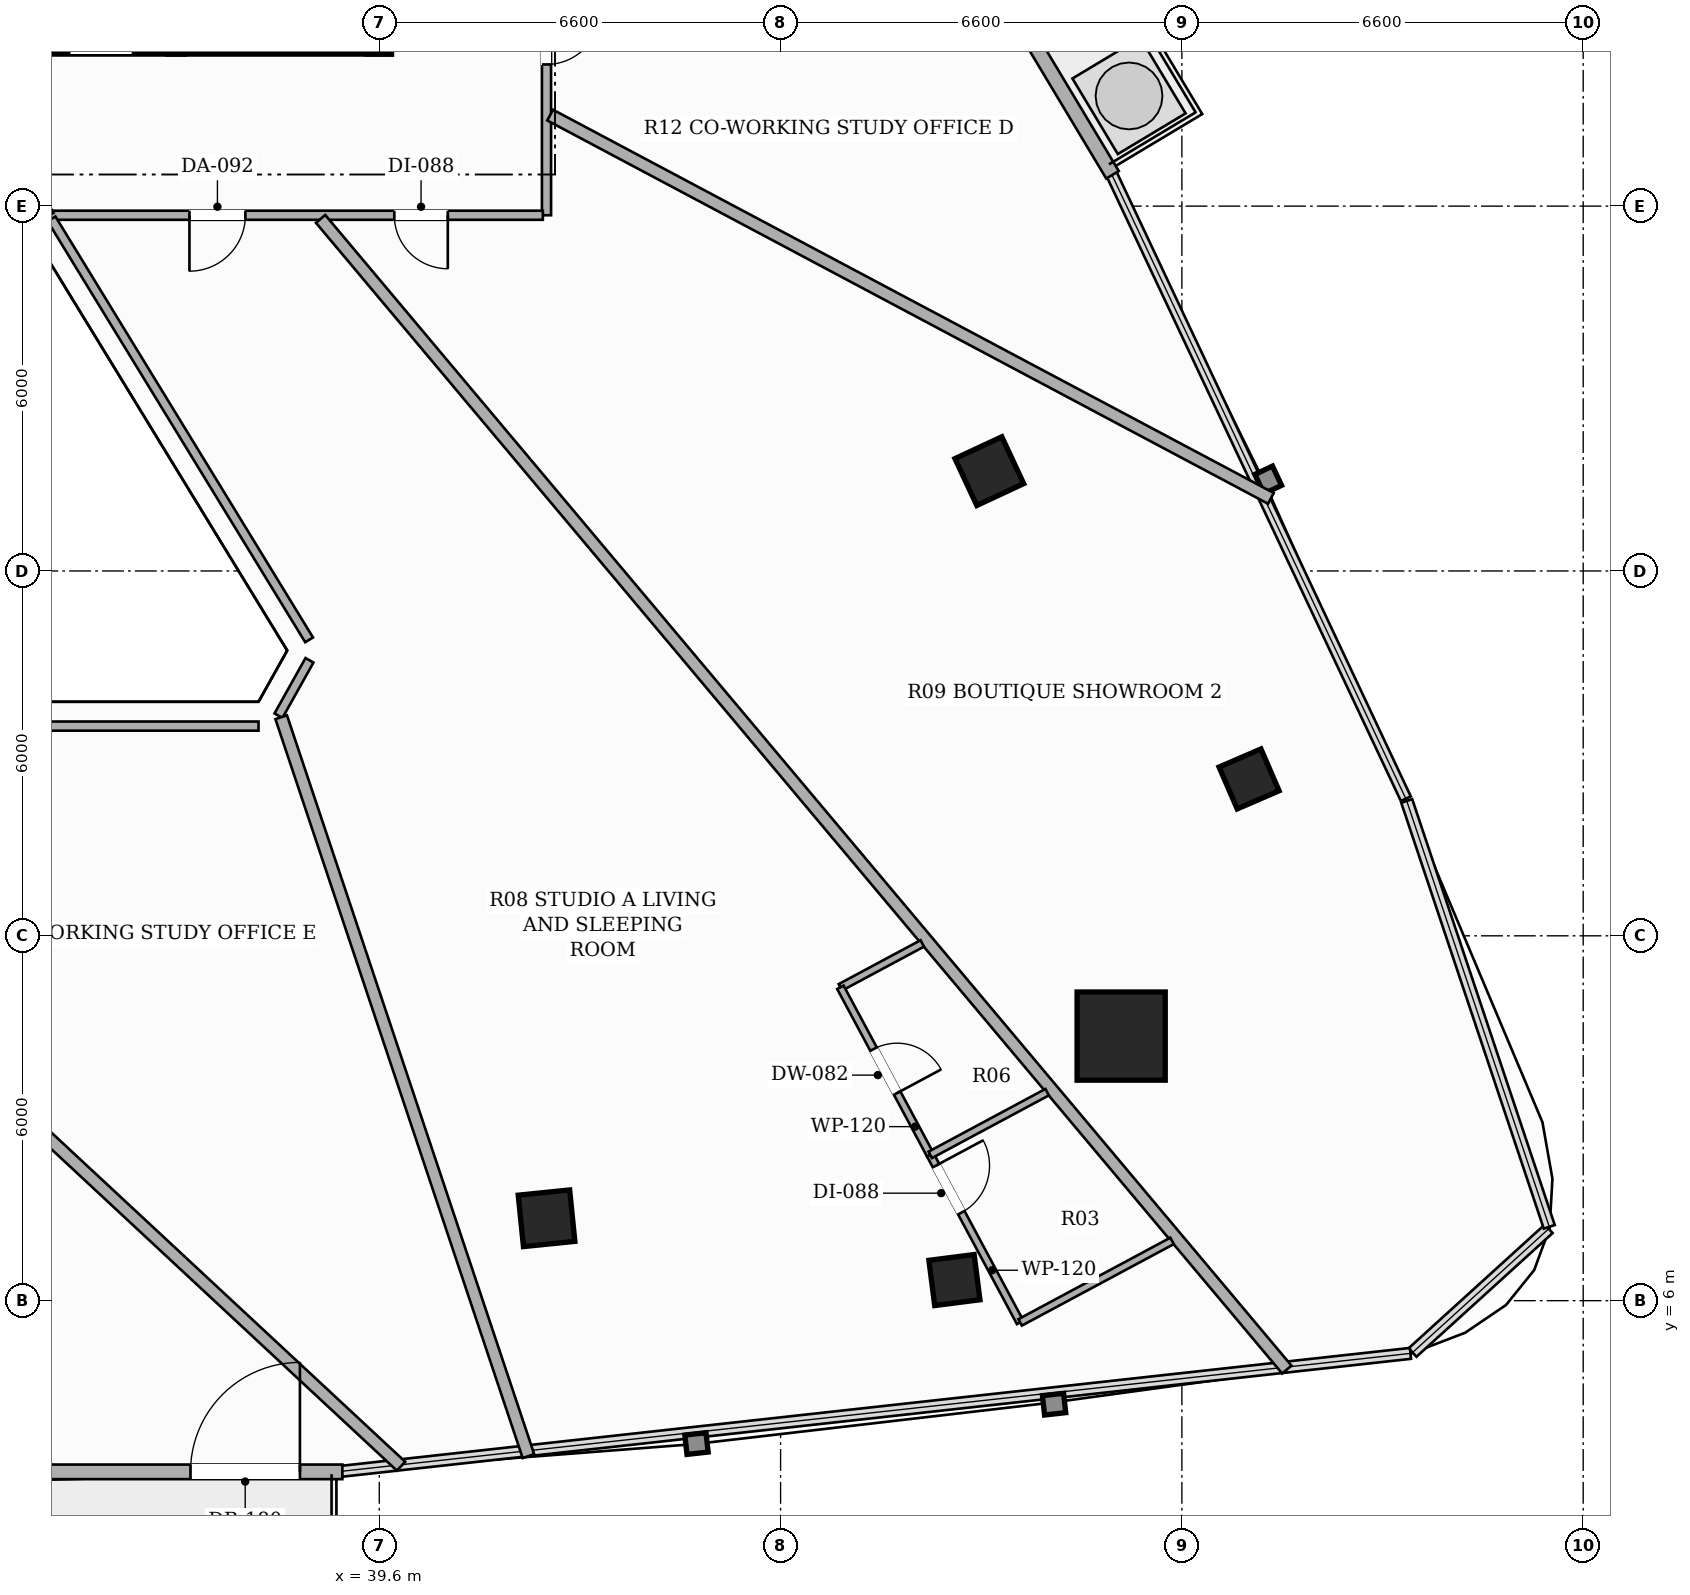
"""IFC4 building model, lengths in metres.
Left out: names, types, materials, properties, quantities, classifications, styles, units other than length and angle.
Written with IfcOpenShell. Run it as: python <this file> out.ifc"""

import sys

from ifc_helpers import new_model, si_unit, direction, frame, frame_2d, origin, origin_2d, place, context, subcontext, project, spatial, rectangle, hollow_rectangle, extrude, element, fill, save


model = new_model("IFC4")
c1 = context("Model", 3, precision=1e-05, world=origin(), true_north=direction((0.0, 1.0)))
c2 = subcontext(c1, "Body", "Model", "MODEL_VIEW")
j1 = project(units=[si_unit("LENGTHUNIT", "METRE"), si_unit("PLANEANGLEUNIT", "RADIAN")], contexts=[c1])
p1 = place(None, origin())
s1 = spatial("IfcSite", under=j1, at=p1, CompositionType="ELEMENT")
p2 = place(p1, origin())
s2 = spatial("IfcBuilding", under=s1, at=p2, CompositionType="ELEMENT")
p3 = place(p2, frame((0.0, 0.0, 126.5)))
s3 = spatial("IfcBuildingStorey", under=s2, at=p3, CompositionType="ELEMENT", Elevation=126.5)
p4 = place(p3, frame((26.2, 26.7, 0.0), z_axis=(0.0, 0.0, 1.0), x_axis=(1.0, 0.0, 0.0)))
e1 = element("IfcWall", 1, at=p4, inside=s3, PredefinedType="SHEAR", context=c2, shape_type="SweptSolid", body=[
    extrude(rectangle(XDim=13.6, YDim=0.4, at=frame_2d((6.8, 0.0))), origin(), (0.0, 0.0, 1.0), 3.3),
])
p5 = place(p4, frame((4.35, 0.0, 0.0)))
e2 = element("IfcOpeningElement", 2, at=p5, cuts=e1, PredefinedType="OPENING", context=c2, shape_type="SweptSolid", body=[
    extrude(rectangle(XDim=1.05, YDim=2.15, at=frame_2d((0.525, 1.075))), frame((0.0, 0.21, 0.0), z_axis=(0.0, -1.0, 0.0), x_axis=(1.0, 0.0, 0.0)), (0.0, 0.0, 1.0), 0.42),
])
p6 = place(p4, frame((8.3, 0.0, 0.0)))
e3 = element("IfcOpeningElement", 3, at=p6, cuts=e1, PredefinedType="OPENING", context=c2, shape_type="SweptSolid", body=[
    extrude(rectangle(XDim=1.05, YDim=2.15, at=frame_2d((0.525, 1.075))), frame((0.0, 0.21, 0.0), z_axis=(0.0, -1.0, 0.0), x_axis=(1.0, 0.0, 0.0)), (0.0, 0.0, 1.0), 0.42),
])
p7 = place(p3, frame((39.6, 26.5, 0.0), z_axis=(0.0, 0.0, 1.0), x_axis=(0.0, 1.0, 0.0)))
e4 = element("IfcWall", 4, at=p7, inside=s3, PredefinedType="SHEAR", context=c2, shape_type="SweptSolid", body=[
    extrude(rectangle(XDim=7.6, YDim=0.4, at=frame_2d((3.8, 0.0))), origin(), (0.0, 0.0, 1.0), 3.3),
])
p8 = place(p3, frame((36.26, 26.5, 0.0), z_axis=(0.0, 0.0, 1.0), x_axis=(0.0, 1.0, 0.0)))
e5 = element("IfcWall", 5, at=p8, inside=s3, PredefinedType="SHEAR", context=c2, shape_type="SweptSolid", body=[
    extrude(rectangle(XDim=8.15, YDim=0.28, at=frame_2d((4.075, 0.0))), origin(), (0.0, 0.0, 1.0), 3.3),
])
p9 = place(p8, frame((0.6, 0.0, 0.0)))
e6 = element("IfcOpeningElement", 6, at=p9, cuts=e5, PredefinedType="OPENING", context=c2, shape_type="SweptSolid", body=[
    extrude(rectangle(XDim=1.05, YDim=2.15, at=frame_2d((0.525, 1.075))), frame((0.0, 0.15, 0.0), z_axis=(0.0, -1.0, 0.0), x_axis=(1.0, 0.0, 0.0)), (0.0, 0.0, 1.0), 0.3),
])
p10 = place(p3, frame((51.801, 10.351, 0.0), z_axis=(0.0, 0.0, 1.0), x_axis=(1.0, 0.0, 0.0)))
e7 = element("IfcColumn", 7, at=p10, inside=s3, PredefinedType="COLUMN", context=c2, shape_type="SweptSolid", body=[
    extrude(hollow_rectangle(XDim=1.45, YDim=1.45, WallThickness=0.045, at=origin_2d()), origin(), (0.0, 0.0, 1.0), 3.3),
])
for number, where, z_axis, x_axis in (
    (8, (42.351, 7.355, 0.0), (0.0, 0.0, 1.0), (0.995, 0.101, 0.0)),
    (9, (49.633, 19.642, 0.0), (0.0, 0.0, 1.0), (-0.423, 0.906, 0.0)),
):
    element("IfcColumn", number, at=place(p3, frame(where, z_axis=z_axis, x_axis=x_axis)), inside=s3, PredefinedType="COLUMN", context=c2, shape_type="SweptSolid", body=[
        extrude(hollow_rectangle(XDim=0.85, YDim=0.85, WallThickness=0.028, at=origin_2d()), origin(), (0.0, 0.0, 1.0), 3.3),
    ])
for number, where, z_axis, x_axis in (
    (10, (49.059, 6.339, 0.0), (0.0, 0.0, 1.0), (0.992, 0.127, 0.0)),
    (11, (53.905, 14.58, 0.0), (0.0, 0.0, 1.0), (-0.397, 0.918, 0.0)),
):
    element("IfcColumn", number, at=place(p3, frame(where, z_axis=z_axis, x_axis=x_axis)), inside=s3, PredefinedType="COLUMN", context=c2, shape_type="SweptSolid", body=[
        extrude(hollow_rectangle(XDim=0.75, YDim=0.75, WallThickness=0.025, at=origin_2d()), origin(), (0.0, 0.0, 1.0), 3.3),
    ])
p11 = place(p3, frame((27.007, 3.185, 0.0), z_axis=(0.0, 0.0, 1.0), x_axis=(1.0, 0.0, 0.0)))
e12 = element("IfcWall", 12, at=p11, inside=s3, PredefinedType="SOLIDWALL", context=c2, shape_type="SweptSolid", body=[
    extrude(rectangle(XDim=11.986, YDim=0.24, at=frame_2d((5.993, 0.0))), origin(), (0.0, 0.0, 1.0), 2.624),
])
p12 = place(p11, frame((9.488, 0.0, 0.0)))
e13 = element("IfcOpeningElement", 13, at=p12, cuts=e12, PredefinedType="OPENING", context=c2, shape_type="SweptSolid", body=[
    extrude(rectangle(XDim=1.8, YDim=2.2, at=frame_2d((0.9, 1.1))), frame((0.0, 0.13, 0.0), z_axis=(0.0, -1.0, 0.0), x_axis=(1.0, 0.0, 0.0)), (0.0, 0.0, 1.0), 0.26),
])
p13 = place(p3, frame((51.659, 24.515, 0.0), z_axis=(0.0, 0.0, 1.0), x_axis=(-0.514343998995, 0.857583961311, 0.0)))
e14 = element("IfcWall", 14, at=p13, inside=s3, PredefinedType="SOLIDWALL", context=c2, shape_type="SweptSolid", body=[
    extrude(rectangle(XDim=11.593, YDim=0.24, at=frame_2d((5.797, 0.0))), origin(), (0.0, 0.0, 1.0), 2.624),
])
p14 = place(p13, frame((9.096, 0.0, 0.0)))
e15 = element("IfcOpeningElement", 15, at=p14, cuts=e14, PredefinedType="OPENING", context=c2, shape_type="SweptSolid", body=[
    extrude(rectangle(XDim=1.8, YDim=2.2, at=frame_2d((0.9, 1.1))), frame((0.0, 0.13, 0.0), z_axis=(0.0, -1.0, 0.0), x_axis=(1.0, 0.0, 0.0)), (0.0, 0.0, 1.0), 0.26),
])
p15 = place(p3, frame((42.35, 28.34, 0.0), z_axis=(0.0, 0.0, 1.0), x_axis=(0.0, -1.0, 0.0)))
e16 = element("IfcWall", 16, at=p15, inside=s3, PredefinedType="PARTITIONING", context=c2, shape_type="SweptSolid", body=[
    extrude(rectangle(XDim=4.49, YDim=0.15, at=frame_2d((2.245, 0.0))), origin(), (0.0, 0.0, 1.0), 2.721),
])
p16 = place(p15, frame((1.13, 0.0, 0.0)))
e17 = element("IfcOpeningElement", 17, at=p16, cuts=e16, PredefinedType="OPENING", context=c2, shape_type="SweptSolid", body=[
    extrude(rectangle(XDim=0.88, YDim=2.1, at=frame_2d((0.44, 1.05))), frame((0.0, 0.085, 0.0), z_axis=(0.0, -1.0, 0.0), x_axis=(1.0, 0.0, 0.0)), (0.0, 0.0, 1.0), 0.17),
])
p17 = place(p3, frame((42.29, 23.85, 0.0), z_axis=(0.0, 0.0, 1.0), x_axis=(-1.0, 0.0, 0.0)))
e18 = element("IfcWall", 18, at=p17, inside=s3, PredefinedType="PARTITIONING", context=c2, shape_type="SweptSolid", body=[
    extrude(rectangle(XDim=8.111, YDim=0.15, at=frame_2d((4.056, 0.0))), origin(), (0.0, 0.0, 1.0), 2.492),
])
p18 = place(p17, frame((1.563, 0.0, 0.0)))
e19 = element("IfcOpeningElement", 19, at=p18, cuts=e18, PredefinedType="OPENING", context=c2, shape_type="SweptSolid", body=[
    extrude(rectangle(XDim=0.88, YDim=2.1, at=frame_2d((0.44, 1.05))), frame((0.0, 0.085, 0.0), z_axis=(0.0, -1.0, 0.0), x_axis=(1.0, 0.0, 0.0)), (0.0, 0.0, 1.0), 0.17),
])
p19 = place(p17, frame((4.892, 0.0, 0.0)))
e20 = element("IfcOpeningElement", 20, at=p19, cuts=e18, PredefinedType="OPENING", context=c2, shape_type="SweptSolid", body=[
    extrude(rectangle(XDim=0.92, YDim=2.15, at=frame_2d((0.46, 1.075))), frame((0.0, 0.085, 0.0), z_axis=(0.0, -1.0, 0.0), x_axis=(1.0, 0.0, 0.0)), (0.0, 0.0, 1.0), 0.17),
])
p20 = place(p3, frame((34.179, 23.85, 0.0), z_axis=(0.0, 0.0, 1.0), x_axis=(-0.527828834635, 0.849350764601, 0.0)))
e21 = element("IfcWall", 21, at=p20, inside=s3, PredefinedType="PARTITIONING", context=c2, shape_type="SweptSolid", body=[
    extrude(rectangle(XDim=0.678, YDim=0.15, at=frame_2d((0.339, 0.0))), origin(), (0.0, 0.0, 1.0), 3.06),
])
p21 = place(p3, frame((34.21, 23.79, 0.0), z_axis=(0.0, 0.0, 1.0), x_axis=(0.521925672495, -0.852990968528, 0.0)))
e22 = element("IfcWall", 22, at=p21, inside=s3, PredefinedType="PARTITIONING", context=c2, shape_type="SweptSolid", body=[
    extrude(rectangle(XDim=8.116, YDim=0.15, at=frame_2d((4.058, 0.0))), origin(), (0.0, 0.0, 1.0), 2.721),
])
p22 = place(p3, frame((38.452, 16.531, 0.0), z_axis=(0.0, 0.0, 1.0), x_axis=(-0.488539276118, -0.872541904833, 0.0)))
e23 = element("IfcWall", 23, at=p22, inside=s3, PredefinedType="PARTITIONING", context=c2, shape_type="SweptSolid", body=[
    extrude(rectangle(XDim=1.044, YDim=0.15, at=frame_2d((0.522, 0.0))), origin(), (0.0, 0.0, 1.0), 3.06),
])
p23 = place(p3, frame((37.614, 15.449, 0.0), z_axis=(0.0, 0.0, 1.0), x_axis=(-1.0, 0.0, 0.0)))
e24 = element("IfcWall", 24, at=p23, inside=s3, PredefinedType="PARTITIONING", context=c2, shape_type="SweptSolid", body=[
    extrude(rectangle(XDim=9.228, YDim=0.15, at=frame_2d((4.614, 0.0))), origin(), (0.0, 0.0, 1.0), 2.721),
])
p24 = place(p3, frame((54.526, 4.867, 0.0), z_axis=(0.0, 0.0, 1.0), x_axis=(-0.643084567011, 0.765795168222, 0.0)))
e25 = element("IfcWall", 25, at=p24, inside=s3, PredefinedType="PARTITIONING", context=c2, shape_type="SweptSolid", body=[
    extrude(rectangle(XDim=24.71, YDim=0.2, at=frame_2d((12.355, 0.0))), origin(), (0.0, 0.0, 1.0), 2.413),
])
p25 = place(p3, frame((42.41, 25.497, 0.0), z_axis=(0.0, 0.0, 1.0), x_axis=(0.882944726502, -0.46947695358, 0.0)))
e26 = element("IfcWall", 26, at=p25, inside=s3, PredefinedType="PARTITIONING", context=c2, shape_type="SweptSolid", body=[
    extrude(rectangle(XDim=13.426, YDim=0.2, at=frame_2d((6.713, 0.0))), origin(), (0.0, 0.0, 1.0), 2.413),
])
p26 = place(p3, frame((42.053, 3.444, 0.0), z_axis=(0.0, 0.0, 1.0), x_axis=(-0.317325063931, 0.948316826699, 0.0)))
e27 = element("IfcWall", 27, at=p26, inside=s3, PredefinedType="PARTITIONING", context=c2, shape_type="SweptSolid", body=[
    extrude(rectangle(XDim=12.813, YDim=0.2, at=frame_2d((6.406, 0.0))), origin(), (0.0, 0.0, 1.0), 2.413),
])
p27 = place(p3, frame((39.958, 3.278, 0.0), z_axis=(0.0, 0.0, 1.0), x_axis=(-0.732155976475, 0.681137009795, 0.0)))
e28 = element("IfcWall", 28, at=p27, inside=s3, PredefinedType="PARTITIONING", context=c2, shape_type="SweptSolid", body=[
    extrude(rectangle(XDim=18.778, YDim=0.2, at=frame_2d((9.389, 0.0))), origin(), (0.0, 0.0, 1.0), 2.413),
])
p28 = place(p3, frame((48.53, 11.875, 0.0), z_axis=(0.0, 0.0, 1.0), x_axis=(-0.881239847135, -0.472669368398, 0.0)))
e29 = element("IfcWall", 29, at=p28, inside=s3, PredefinedType="PARTITIONING", context=c2, shape_type="SweptSolid", body=[
    extrude(rectangle(XDim=1.527, YDim=0.12, at=frame_2d((0.764, 0.0))), origin(), (0.0, 0.0, 1.0), 3.06),
])
p29 = place(p3, frame((47.184, 11.153, 0.0), z_axis=(0.0, 0.0, 1.0), x_axis=(0.472734891499, -0.881204699465, 0.0)))
e30 = element("IfcWall", 30, at=p29, inside=s3, PredefinedType="PARTITIONING", context=c2, shape_type="SweptSolid", body=[
    extrude(rectangle(XDim=3.126, YDim=0.12, at=frame_2d((1.563, 0.0))), origin(), (0.0, 0.0, 1.0), 2.721),
])
p30 = place(p29, frame((1.153, 0.0, 0.0)))
e31 = element("IfcOpeningElement", 31, at=p30, cuts=e30, PredefinedType="OPENING", context=c2, shape_type="SweptSolid", body=[
    extrude(rectangle(XDim=0.82, YDim=2.1, at=frame_2d((0.41, 1.05))), frame((0.0, 0.07, 0.0), z_axis=(0.0, -1.0, 0.0), x_axis=(1.0, 0.0, 0.0)), (0.0, 0.0, 1.0), 0.14),
])
p31 = place(p3, frame((48.662, 8.398, 0.0), z_axis=(0.0, 0.0, 1.0), x_axis=(0.472706781447, -0.881219778928, 0.0)))
e32 = element("IfcWall", 32, at=p31, inside=s3, PredefinedType="PARTITIONING", context=c2, shape_type="SweptSolid", body=[
    extrude(rectangle(XDim=3.126, YDim=0.12, at=frame_2d((1.563, 0.0))), origin(), (0.0, 0.0, 1.0), 2.413),
])
p32 = place(p31, frame((0.2, 0.0, 0.0)))
e33 = element("IfcOpeningElement", 33, at=p32, cuts=e32, PredefinedType="OPENING", context=c2, shape_type="SweptSolid", body=[
    extrude(rectangle(XDim=0.88, YDim=2.1, at=frame_2d((0.44, 1.05))), frame((0.0, 0.07, 0.0), z_axis=(0.0, -1.0, 0.0), x_axis=(1.0, 0.0, 0.0)), (0.0, 0.0, 1.0), 0.14),
])
p33 = place(p3, frame((50.14, 5.643, 0.0), z_axis=(0.0, 0.0, 1.0), x_axis=(0.881244272045, 0.472661118548, 0.0)))
e34 = element("IfcWall", 34, at=p33, inside=s3, PredefinedType="PARTITIONING", context=c2, shape_type="SweptSolid", body=[
    extrude(rectangle(XDim=2.835, YDim=0.12, at=frame_2d((1.417, 0.0))), origin(), (0.0, 0.0, 1.0), 2.619),
])
p34 = place(p3, frame((50.584, 9.429, 0.0), z_axis=(0.0, 0.0, 1.0), x_axis=(-0.88120690194, -0.472730785937, 0.0)))
e35 = element("IfcWall", 35, at=p34, inside=s3, PredefinedType="PARTITIONING", context=c2, shape_type="SweptSolid", body=[
    extrude(rectangle(XDim=2.181, YDim=0.12, at=frame_2d((1.09, 0.0))), origin(), (0.0, 0.0, 1.0), 3.06),
])
p35 = place(p12, origin())
e36 = element("IfcDoor", 36, at=p35, inside=s3, OperationType="SINGLE_SWING_RIGHT", PredefinedType="DOOR", context=c2, shape_type="SweptSolid", body=[
    extrude(rectangle(XDim=1.8, YDim=2.2, at=frame_2d((0.9, 1.1))), frame((0.0, 0.025, 0.0), z_axis=(0.0, -1.0, 0.0), x_axis=(1.0, 0.0, 0.0)), (0.0, 0.0, 1.0), 0.05),
])
fill(e13, e36)
p36 = place(p18, origin())
e37 = element("IfcDoor", 37, at=p36, inside=s3, OperationType="SINGLE_SWING_LEFT", PredefinedType="DOOR", context=c2, shape_type="SweptSolid", body=[
    extrude(rectangle(XDim=0.88, YDim=2.1, at=frame_2d((0.44, 1.05))), frame((0.0, 0.025, 0.0), z_axis=(0.0, -1.0, 0.0), x_axis=(1.0, 0.0, 0.0)), (0.0, 0.0, 1.0), 0.05),
])
fill(e19, e37)
p37 = place(p19, origin())
e38 = element("IfcDoor", 38, at=p37, inside=s3, OperationType="SINGLE_SWING_RIGHT", PredefinedType="DOOR", context=c2, shape_type="SweptSolid", body=[
    extrude(rectangle(XDim=0.92, YDim=2.15, at=frame_2d((0.46, 1.075))), frame((0.0, 0.025, 0.0), z_axis=(0.0, -1.0, 0.0), x_axis=(1.0, 0.0, 0.0)), (0.0, 0.0, 1.0), 0.05),
])
fill(e20, e38)
p38 = place(p30, origin())
e39 = element("IfcDoor", 39, at=p38, inside=s3, OperationType="SINGLE_SWING_RIGHT", PredefinedType="DOOR", context=c2, shape_type="SweptSolid", body=[
    extrude(rectangle(XDim=0.82, YDim=2.1, at=frame_2d((0.41, 1.05))), frame((0.0, 0.025, 0.0), z_axis=(0.0, -1.0, 0.0), x_axis=(1.0, 0.0, 0.0)), (0.0, 0.0, 1.0), 0.05),
])
fill(e31, e39)
p39 = place(p32, origin())
e40 = element("IfcDoor", 40, at=p39, inside=s3, OperationType="SINGLE_SWING_LEFT", PredefinedType="DOOR", context=c2, shape_type="SweptSolid", body=[
    extrude(rectangle(XDim=0.88, YDim=2.1, at=frame_2d((0.44, 1.05))), frame((0.0, 0.025, 0.0), z_axis=(0.0, -1.0, 0.0), x_axis=(1.0, 0.0, 0.0)), (0.0, 0.0, 1.0), 0.05),
])
fill(e33, e40)
p40 = place(p16, origin())
e41 = element("IfcDoor", 41, at=p40, inside=s3, OperationType="SINGLE_SWING_LEFT", PredefinedType="DOOR", context=c2, shape_type="SweptSolid", body=[
    extrude(rectangle(XDim=0.88, YDim=2.1, at=frame_2d((0.44, 1.05))), frame((0.0, 0.025, 0.0), z_axis=(0.0, -1.0, 0.0), x_axis=(1.0, 0.0, 0.0)), (0.0, 0.0, 1.0), 0.05),
])
fill(e17, e41)
save(model, sys.argv[1])
